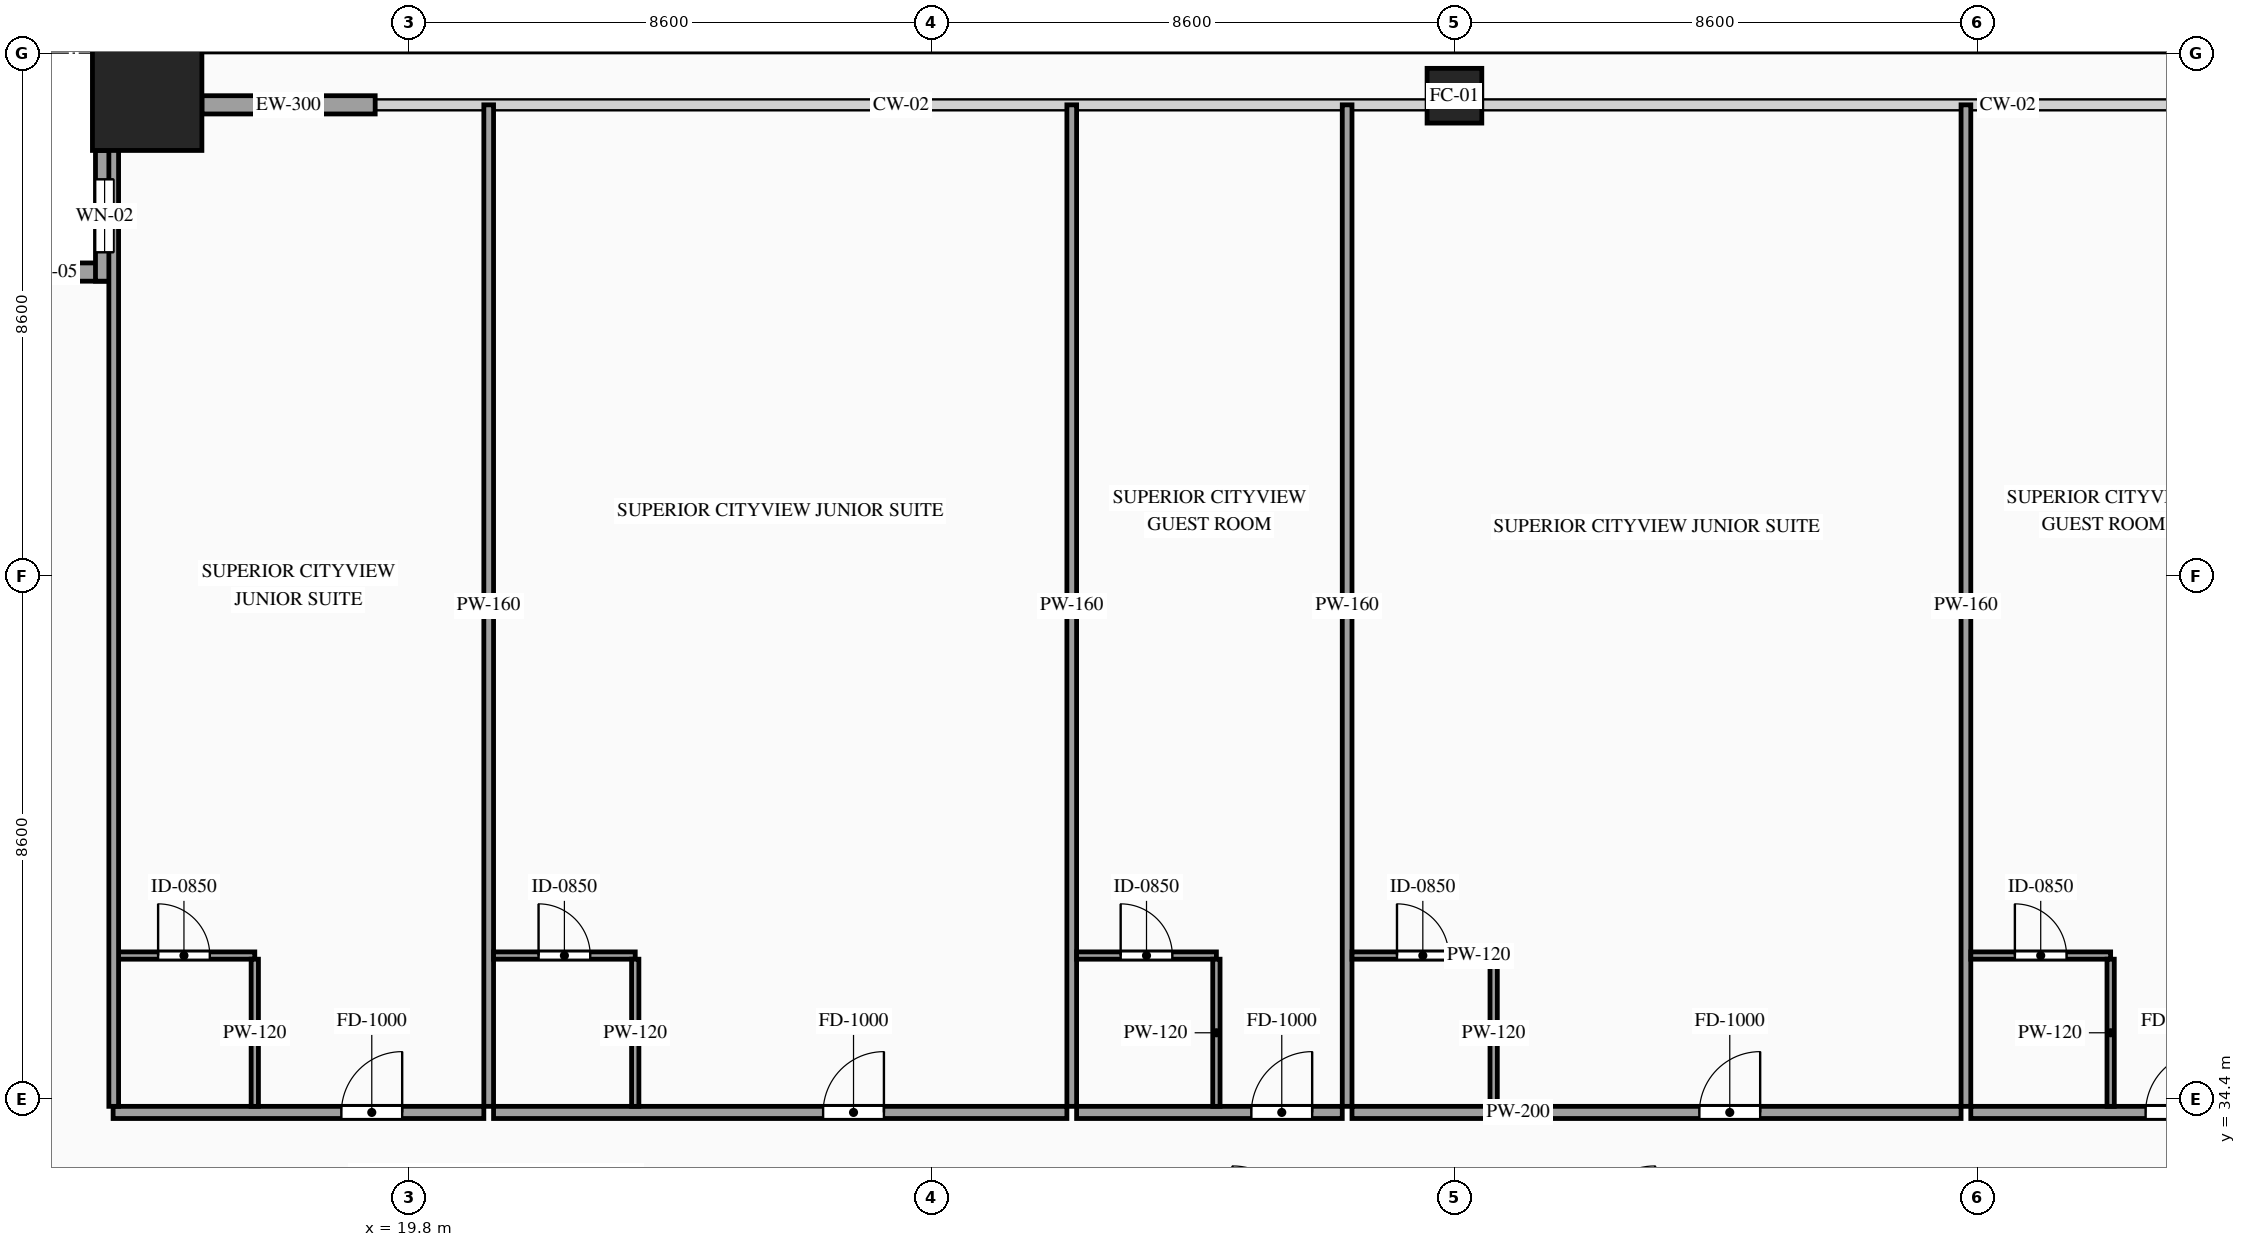
"""IFC4 building model, lengths in metres.
Left out: names, types, materials, properties, quantities, classifications, styles, units other than length and angle.
Written with IfcOpenShell. Run it as: python <this file> out.ifc"""

import sys

from ifc_helpers import new_model, si_unit, direction, frame, frame_2d, origin, origin_2d, place, context, subcontext, project, spatial, rectangle, hollow_rectangle, extrude, source, transform, mapped, element, fill, save


model = new_model("IFC4")
c1 = context("Model", 3, precision=1e-05, world=origin(), true_north=direction((0.0, 1.0)))
c2 = subcontext(c1, "Body", "Model", "MODEL_VIEW")
j1 = project(units=[si_unit("LENGTHUNIT", "METRE"), si_unit("PLANEANGLEUNIT", "RADIAN")], contexts=[c1])
p1 = place(None, origin())
s1 = spatial("IfcSite", under=j1, at=p1, CompositionType="ELEMENT")
p2 = place(p1, origin())
s2 = spatial("IfcBuilding", under=s1, at=p2, CompositionType="ELEMENT")
p3 = place(p2, frame((0.0, 0.0, 71.2)))
s3 = spatial("IfcBuildingStorey", under=s2, at=p3, CompositionType="ELEMENT", Elevation=71.2)
m1 = source(origin(), c2, "Body", "SweptSolid", [
    extrude(hollow_rectangle(XDim=1.8, YDim=1.8, WallThickness=0.08, at=origin_2d()), origin(), (0.0, 0.0, 1.0), 3.6),
])
p4 = place(p3, frame((15.5, 50.9, 0.0), z_axis=(0.0, 0.0, 1.0), x_axis=(1.0, 0.0, 0.0)))
e1 = element("IfcColumn", 1, at=p4, inside=s3, PredefinedType="COLUMN", context=c2, shape_type="MappedRepresentation", body=[
    mapped(m1, transform((0.0, 0.0, 0.0), scale=1.0)),
])
m2 = source(origin(), c2, "Body", "SweptSolid", [
    extrude(hollow_rectangle(XDim=0.9, YDim=0.9, WallThickness=0.042, at=origin_2d()), origin(), (0.0, 0.0, 1.0), 3.6),
])
p5 = place(p3, frame((37.0, 50.9, 0.0), z_axis=(0.0, 0.0, 1.0), x_axis=(1.0, 0.0, 0.0)))
e2 = element("IfcColumn", 2, at=p5, inside=s3, PredefinedType="COLUMN", context=c2, shape_type="MappedRepresentation", body=[
    mapped(m2, transform((0.0, 0.0, 0.0), scale=1.0)),
])
p6 = place(p3, frame((14.95, 48.0, 0.0), z_axis=(0.0, 0.0, 1.0), x_axis=(-1.0, 0.0, 0.0)))
e3 = element("IfcWall", 3, at=p6, inside=s3, PredefinedType="SOLIDWALL", context=c2, shape_type="SweptSolid", body=[
    extrude(rectangle(XDim=2.15, YDim=0.3, at=frame_2d((1.075, 0.0))), origin(), (0.0, 0.0, 1.0), 3.38),
])
p7 = place(p6, frame((0.625, 0.0, 0.85)))
e4 = element("IfcOpeningElement", 4, at=p7, cuts=e3, PredefinedType="OPENING", context=c2, shape_type="SweptSolid", body=[
    extrude(rectangle(XDim=0.9, YDim=1.5, at=frame_2d((0.45, 0.75))), frame((0.0, 0.165, 0.0), z_axis=(0.0, -1.0, 0.0), x_axis=(1.0, 0.0, 0.0)), (0.0, 0.0, 1.0), 0.33),
])
p8 = place(p3, frame((14.8, 50.0, 0.0), z_axis=(0.0, 0.0, 1.0), x_axis=(0.0, -1.0, 0.0)))
e5 = element("IfcWall", 5, at=p8, inside=s3, PredefinedType="SOLIDWALL", context=c2, shape_type="SweptSolid", body=[
    extrude(rectangle(XDim=2.15, YDim=0.3, at=frame_2d((1.075, 0.0))), origin(), (0.0, 0.0, 1.0), 3.38),
])
p9 = place(p8, frame((0.475, 0.0, 0.85)))
e6 = element("IfcOpeningElement", 6, at=p9, cuts=e5, PredefinedType="OPENING", context=c2, shape_type="SweptSolid", body=[
    extrude(rectangle(XDim=1.2, YDim=2.1, at=frame_2d((0.6, 1.05))), frame((0.0, 0.165, 0.0), z_axis=(0.0, -1.0, 0.0), x_axis=(1.0, 0.0, 0.0)), (0.0, 0.0, 1.0), 0.33),
])
m3 = source(origin(), c2, "Body", "SweptSolid", [
    extrude(rectangle(XDim=2.85, YDim=0.3, at=frame_2d((1.425, 0.0))), origin(), (0.0, 0.0, 1.0), 2.775),
])
p10 = place(p3, frame((16.4, 50.75, 0.0), z_axis=(0.0, 0.0, 1.0), x_axis=(1.0, 0.0, 0.0)))
e7 = element("IfcWall", 7, at=p10, inside=s3, PredefinedType="SOLIDWALL", context=c2, shape_type="MappedRepresentation", body=[
    mapped(m3, transform((0.0, 0.0, 0.0), scale=1.0)),
])
p11 = place(p3, frame((14.94, 34.18, 0.0), z_axis=(0.0, 0.0, 1.0), x_axis=(1.0, 0.0, 0.0)))
e8 = element("IfcWall", 8, at=p11, inside=s3, PredefinedType="PARTITIONING", context=c2, shape_type="SweptSolid", body=[
    extrude(rectangle(XDim=6.097, YDim=0.2, at=frame_2d((3.049, 0.0))), origin(), (0.0, 0.0, 1.0), 3.38),
])
p12 = place(p11, frame((3.754, 0.0, 0.0)))
e9 = element("IfcOpeningElement", 9, at=p12, cuts=e8, PredefinedType="OPENING", context=c2, shape_type="SweptSolid", body=[
    extrude(rectangle(XDim=1.0, YDim=2.2, at=frame_2d((0.5, 1.1))), frame((0.0, 0.115, 0.0), z_axis=(0.0, -1.0, 0.0), x_axis=(1.0, 0.0, 0.0)), (0.0, 0.0, 1.0), 0.23),
])
m4 = source(origin(), c2, "Body", "SweptSolid", [
    extrude(rectangle(XDim=16.47, YDim=0.16, at=frame_2d((8.235, 0.0))), origin(), (0.0, 0.0, 1.0), 3.38),
])
p13 = place(p3, frame((21.117, 34.28, 0.0), z_axis=(0.0, 0.0, 1.0), x_axis=(0.0, 1.0, 0.0)))
e10 = element("IfcWall", 10, at=p13, inside=s3, PredefinedType="PARTITIONING", context=c2, shape_type="MappedRepresentation", body=[
    mapped(m4, transform((0.0, 0.0, 0.0), scale=1.0)),
])
p14 = place(p3, frame((14.94, 36.76, 0.0), z_axis=(0.0, 0.0, 1.0), x_axis=(1.0, 0.0, 0.0)))
e11 = element("IfcWall", 11, at=p14, inside=s3, PredefinedType="PARTITIONING", context=c2, shape_type="SweptSolid", body=[
    extrude(rectangle(XDim=2.33, YDim=0.12, at=frame_2d((1.165, 0.0))), origin(), (0.0, 0.0, 1.0), 3.38),
])
p15 = place(p14, frame((0.74, 0.0, 0.0)))
e12 = element("IfcOpeningElement", 12, at=p15, cuts=e11, PredefinedType="OPENING", context=c2, shape_type="SweptSolid", body=[
    extrude(rectangle(XDim=0.85, YDim=2.1, at=frame_2d((0.425, 1.05))), frame((0.0, 0.075, 0.0), z_axis=(0.0, -1.0, 0.0), x_axis=(1.0, 0.0, 0.0)), (0.0, 0.0, 1.0), 0.15),
])
m5 = source(origin(), c2, "Body", "SweptSolid", [
    extrude(rectangle(XDim=2.42, YDim=0.12, at=frame_2d((1.21, 0.0))), origin(), (0.0, 0.0, 1.0), 3.38),
])
p16 = place(p3, frame((17.27, 34.28, 0.0), z_axis=(0.0, 0.0, 1.0), x_axis=(0.0, 1.0, 0.0)))
e13 = element("IfcWall", 13, at=p16, inside=s3, PredefinedType="PARTITIONING", context=c2, shape_type="MappedRepresentation", body=[
    mapped(m5, transform((0.0, 0.0, 0.0), scale=1.0)),
])
p17 = place(p3, frame((21.197, 34.18, 0.0), z_axis=(0.0, 0.0, 1.0), x_axis=(1.0, 0.0, 0.0)))
e14 = element("IfcWall", 14, at=p17, inside=s3, PredefinedType="PARTITIONING", context=c2, shape_type="SweptSolid", body=[
    extrude(rectangle(XDim=9.429, YDim=0.2, at=frame_2d((4.714, 0.0))), origin(), (0.0, 0.0, 1.0), 3.38),
])
p18 = place(p17, frame((5.42, 0.0, 0.0)))
e15 = element("IfcOpeningElement", 15, at=p18, cuts=e14, PredefinedType="OPENING", context=c2, shape_type="SweptSolid", body=[
    extrude(rectangle(XDim=1.0, YDim=2.2, at=frame_2d((0.5, 1.1))), frame((0.0, 0.115, 0.0), z_axis=(0.0, -1.0, 0.0), x_axis=(1.0, 0.0, 0.0)), (0.0, 0.0, 1.0), 0.23),
])
p19 = place(p3, frame((30.706, 34.28, 0.0), z_axis=(0.0, 0.0, 1.0), x_axis=(0.0, 1.0, 0.0)))
e16 = element("IfcWall", 16, at=p19, inside=s3, PredefinedType="PARTITIONING", context=c2, shape_type="MappedRepresentation", body=[
    mapped(m4, transform((0.0, 0.0, 0.0), scale=1.0)),
])
p20 = place(p3, frame((21.197, 36.76, 0.0), z_axis=(0.0, 0.0, 1.0), x_axis=(1.0, 0.0, 0.0)))
e17 = element("IfcWall", 17, at=p20, inside=s3, PredefinedType="PARTITIONING", context=c2, shape_type="SweptSolid", body=[
    extrude(rectangle(XDim=2.33, YDim=0.12, at=frame_2d((1.165, 0.0))), origin(), (0.0, 0.0, 1.0), 3.38),
])
p21 = place(p20, frame((0.74, 0.0, 0.0)))
e18 = element("IfcOpeningElement", 18, at=p21, cuts=e17, PredefinedType="OPENING", context=c2, shape_type="SweptSolid", body=[
    extrude(rectangle(XDim=0.85, YDim=2.1, at=frame_2d((0.425, 1.05))), frame((0.0, 0.075, 0.0), z_axis=(0.0, -1.0, 0.0), x_axis=(1.0, 0.0, 0.0)), (0.0, 0.0, 1.0), 0.15),
])
p22 = place(p3, frame((23.527, 34.28, 0.0), z_axis=(0.0, 0.0, 1.0), x_axis=(0.0, 1.0, 0.0)))
e19 = element("IfcWall", 19, at=p22, inside=s3, PredefinedType="PARTITIONING", context=c2, shape_type="MappedRepresentation", body=[
    mapped(m5, transform((0.0, 0.0, 0.0), scale=1.0)),
])
p23 = place(p3, frame((30.786, 34.18, 0.0), z_axis=(0.0, 0.0, 1.0), x_axis=(1.0, 0.0, 0.0)))
e20 = element("IfcWall", 20, at=p23, inside=s3, PredefinedType="PARTITIONING", context=c2, shape_type="SweptSolid", body=[
    extrude(rectangle(XDim=4.369, YDim=0.2, at=frame_2d((2.185, 0.0))), origin(), (0.0, 0.0, 1.0), 3.38),
])
p24 = place(p23, frame((2.874, 0.0, 0.0)))
e21 = element("IfcOpeningElement", 21, at=p24, cuts=e20, PredefinedType="OPENING", context=c2, shape_type="SweptSolid", body=[
    extrude(rectangle(XDim=1.0, YDim=2.2, at=frame_2d((0.5, 1.1))), frame((0.0, 0.115, 0.0), z_axis=(0.0, -1.0, 0.0), x_axis=(1.0, 0.0, 0.0)), (0.0, 0.0, 1.0), 0.23),
])
p25 = place(p3, frame((35.235, 34.28, 0.0), z_axis=(0.0, 0.0, 1.0), x_axis=(0.0, 1.0, 0.0)))
e22 = element("IfcWall", 22, at=p25, inside=s3, PredefinedType="PARTITIONING", context=c2, shape_type="MappedRepresentation", body=[
    mapped(m4, transform((0.0, 0.0, 0.0), scale=1.0)),
])
p26 = place(p3, frame((30.786, 36.76, 0.0), z_axis=(0.0, 0.0, 1.0), x_axis=(1.0, 0.0, 0.0)))
e23 = element("IfcWall", 23, at=p26, inside=s3, PredefinedType="PARTITIONING", context=c2, shape_type="SweptSolid", body=[
    extrude(rectangle(XDim=2.299, YDim=0.12, at=frame_2d((1.149, 0.0))), origin(), (0.0, 0.0, 1.0), 3.38),
])
p27 = place(p26, frame((0.725, 0.0, 0.0)))
e24 = element("IfcOpeningElement", 24, at=p27, cuts=e23, PredefinedType="OPENING", context=c2, shape_type="SweptSolid", body=[
    extrude(rectangle(XDim=0.85, YDim=2.1, at=frame_2d((0.425, 1.05))), frame((0.0, 0.075, 0.0), z_axis=(0.0, -1.0, 0.0), x_axis=(1.0, 0.0, 0.0)), (0.0, 0.0, 1.0), 0.15),
])
p28 = place(p3, frame((33.085, 34.28, 0.0), z_axis=(0.0, 0.0, 1.0), x_axis=(0.0, 1.0, 0.0)))
e25 = element("IfcWall", 25, at=p28, inside=s3, PredefinedType="PARTITIONING", context=c2, shape_type="MappedRepresentation", body=[
    mapped(m5, transform((0.0, 0.0, 0.0), scale=1.0)),
])
p29 = place(p3, frame((35.315, 34.18, 0.0), z_axis=(0.0, 0.0, 1.0), x_axis=(1.0, 0.0, 0.0)))
e26 = element("IfcWall", 26, at=p29, inside=s3, PredefinedType="PARTITIONING", context=c2, shape_type="SweptSolid", body=[
    extrude(rectangle(XDim=10.017, YDim=0.2, at=frame_2d((5.009, 0.0))), origin(), (0.0, 0.0, 1.0), 3.38),
])
p30 = place(p29, frame((5.713, 0.0, 0.0)))
e27 = element("IfcOpeningElement", 27, at=p30, cuts=e26, PredefinedType="OPENING", context=c2, shape_type="SweptSolid", body=[
    extrude(rectangle(XDim=1.0, YDim=2.2, at=frame_2d((0.5, 1.1))), frame((0.0, 0.115, 0.0), z_axis=(0.0, -1.0, 0.0), x_axis=(1.0, 0.0, 0.0)), (0.0, 0.0, 1.0), 0.23),
])
p31 = place(p3, frame((45.412, 34.28, 0.0), z_axis=(0.0, 0.0, 1.0), x_axis=(0.0, 1.0, 0.0)))
e28 = element("IfcWall", 28, at=p31, inside=s3, PredefinedType="PARTITIONING", context=c2, shape_type="MappedRepresentation", body=[
    mapped(m4, transform((0.0, 0.0, 0.0), scale=1.0)),
])
p32 = place(p3, frame((35.315, 36.76, 0.0), z_axis=(0.0, 0.0, 1.0), x_axis=(1.0, 0.0, 0.0)))
e29 = element("IfcWall", 29, at=p32, inside=s3, PredefinedType="PARTITIONING", context=c2, shape_type="SweptSolid", body=[
    extrude(rectangle(XDim=2.33, YDim=0.12, at=frame_2d((1.165, 0.0))), origin(), (0.0, 0.0, 1.0), 3.38),
])
p33 = place(p32, frame((0.74, 0.0, 0.0)))
e30 = element("IfcOpeningElement", 30, at=p33, cuts=e29, PredefinedType="OPENING", context=c2, shape_type="SweptSolid", body=[
    extrude(rectangle(XDim=0.85, YDim=2.1, at=frame_2d((0.425, 1.05))), frame((0.0, 0.075, 0.0), z_axis=(0.0, -1.0, 0.0), x_axis=(1.0, 0.0, 0.0)), (0.0, 0.0, 1.0), 0.15),
])
p34 = place(p3, frame((37.645, 34.28, 0.0), z_axis=(0.0, 0.0, 1.0), x_axis=(0.0, 1.0, 0.0)))
e31 = element("IfcWall", 31, at=p34, inside=s3, PredefinedType="PARTITIONING", context=c2, shape_type="MappedRepresentation", body=[
    mapped(m5, transform((0.0, 0.0, 0.0), scale=1.0)),
])
p35 = place(p3, frame((45.492, 34.18, 0.0), z_axis=(0.0, 0.0, 1.0), x_axis=(1.0, 0.0, 0.0)))
e32 = element("IfcWall", 32, at=p35, inside=s3, PredefinedType="PARTITIONING", context=c2, shape_type="SweptSolid", body=[
    extrude(rectangle(XDim=4.37, YDim=0.2, at=frame_2d((2.185, 0.0))), origin(), (0.0, 0.0, 1.0), 3.38),
])
p36 = place(p35, frame((2.875, 0.0, 0.0)))
e33 = element("IfcOpeningElement", 33, at=p36, cuts=e32, PredefinedType="OPENING", context=c2, shape_type="SweptSolid", body=[
    extrude(rectangle(XDim=1.0, YDim=2.2, at=frame_2d((0.5, 1.1))), frame((0.0, 0.115, 0.0), z_axis=(0.0, -1.0, 0.0), x_axis=(1.0, 0.0, 0.0)), (0.0, 0.0, 1.0), 0.23),
])
p37 = place(p3, frame((45.492, 36.76, 0.0), z_axis=(0.0, 0.0, 1.0), x_axis=(1.0, 0.0, 0.0)))
e34 = element("IfcWall", 34, at=p37, inside=s3, PredefinedType="PARTITIONING", context=c2, shape_type="SweptSolid", body=[
    extrude(rectangle(XDim=2.3, YDim=0.12, at=frame_2d((1.15, 0.0))), origin(), (0.0, 0.0, 1.0), 3.38),
])
p38 = place(p37, frame((0.725, 0.0, 0.0)))
e35 = element("IfcOpeningElement", 35, at=p38, cuts=e34, PredefinedType="OPENING", context=c2, shape_type="SweptSolid", body=[
    extrude(rectangle(XDim=0.85, YDim=2.1, at=frame_2d((0.425, 1.05))), frame((0.0, 0.075, 0.0), z_axis=(0.0, -1.0, 0.0), x_axis=(1.0, 0.0, 0.0)), (0.0, 0.0, 1.0), 0.15),
])
p39 = place(p3, frame((47.792, 34.28, 0.0), z_axis=(0.0, 0.0, 1.0), x_axis=(0.0, 1.0, 0.0)))
e36 = element("IfcWall", 36, at=p39, inside=s3, PredefinedType="PARTITIONING", context=c2, shape_type="MappedRepresentation", body=[
    mapped(m5, transform((0.0, 0.0, 0.0), scale=1.0)),
])
m6 = source(origin(), c2, "Body", "SweptSolid", [
    extrude(rectangle(XDim=16.32, YDim=0.16, at=frame_2d((8.16, 0.0))), origin(), (0.0, 0.0, 1.0), 3.38),
])
p40 = place(p3, frame((14.95, 34.28, 0.0), z_axis=(0.0, 0.0, 1.0), x_axis=(0.0, 1.0, 0.0)))
e37 = element("IfcWall", 37, at=p40, inside=s3, PredefinedType="PARTITIONING", context=c2, shape_type="MappedRepresentation", body=[
    mapped(m6, transform((0.0, 0.0, 0.0), scale=1.0)),
])
m7 = source(origin(), c2, "Body", "SweptSolid", [
    extrude(rectangle(XDim=0.9, YDim=1.5, at=frame_2d((0.45, 0.75))), frame((0.0, 0.03, 0.0), z_axis=(0.0, -1.0, 0.0), x_axis=(1.0, 0.0, 0.0)), (0.0, 0.0, 1.0), 0.06),
])
p41 = place(p7, origin())
e38 = element("IfcWindow", 38, at=p41, inside=s3, PartitioningType="SINGLE_PANEL", PredefinedType="WINDOW", context=c2, shape_type="MappedRepresentation", body=[
    mapped(m7, transform((0.0, 0.0, 0.0), scale=1.0)),
])
fill(e4, e38)
m8 = source(origin(), c2, "Body", "SweptSolid", [
    extrude(rectangle(XDim=1.2, YDim=2.1, at=frame_2d((0.6, 1.05))), frame((0.0, 0.03, 0.0), z_axis=(0.0, -1.0, 0.0), x_axis=(1.0, 0.0, 0.0)), (0.0, 0.0, 1.0), 0.06),
])
p42 = place(p9, origin())
e39 = element("IfcWindow", 39, at=p42, inside=s3, PartitioningType="SINGLE_PANEL", PredefinedType="WINDOW", context=c2, shape_type="MappedRepresentation", body=[
    mapped(m8, transform((0.0, 0.0, 0.0), scale=1.0)),
])
fill(e6, e39)
m9 = source(origin(), c2, "Body", "SweptSolid", [
    extrude(rectangle(XDim=1.0, YDim=2.2, at=frame_2d((0.5, 1.1))), frame((0.0, 0.025, 0.0), z_axis=(0.0, -1.0, 0.0), x_axis=(1.0, 0.0, 0.0)), (0.0, 0.0, 1.0), 0.05),
])
p43 = place(p12, origin())
e40 = element("IfcDoor", 40, at=p43, inside=s3, OperationType="SINGLE_SWING_RIGHT", PredefinedType="DOOR", context=c2, shape_type="MappedRepresentation", body=[
    mapped(m9, transform((0.0, 0.0, 0.0), scale=1.0)),
])
fill(e9, e40)
m10 = source(origin(), c2, "Body", "SweptSolid", [
    extrude(rectangle(XDim=0.85, YDim=2.1, at=frame_2d((0.425, 1.05))), frame((0.0, 0.025, 0.0), z_axis=(0.0, -1.0, 0.0), x_axis=(1.0, 0.0, 0.0)), (0.0, 0.0, 1.0), 0.05),
])
p44 = place(p15, origin())
e41 = element("IfcDoor", 41, at=p44, inside=s3, OperationType="SINGLE_SWING_LEFT", PredefinedType="DOOR", context=c2, shape_type="MappedRepresentation", body=[
    mapped(m10, transform((0.0, 0.0, 0.0), scale=1.0)),
])
fill(e12, e41)
p45 = place(p18, origin())
e42 = element("IfcDoor", 42, at=p45, inside=s3, OperationType="SINGLE_SWING_RIGHT", PredefinedType="DOOR", context=c2, shape_type="MappedRepresentation", body=[
    mapped(m9, transform((0.0, 0.0, 0.0), scale=1.0)),
])
fill(e15, e42)
p46 = place(p21, origin())
e43 = element("IfcDoor", 43, at=p46, inside=s3, OperationType="SINGLE_SWING_LEFT", PredefinedType="DOOR", context=c2, shape_type="MappedRepresentation", body=[
    mapped(m10, transform((0.0, 0.0, 0.0), scale=1.0)),
])
fill(e18, e43)
p47 = place(p24, origin())
e44 = element("IfcDoor", 44, at=p47, inside=s3, OperationType="SINGLE_SWING_RIGHT", PredefinedType="DOOR", context=c2, shape_type="MappedRepresentation", body=[
    mapped(m9, transform((0.0, 0.0, 0.0), scale=1.0)),
])
fill(e21, e44)
p48 = place(p27, origin())
e45 = element("IfcDoor", 45, at=p48, inside=s3, OperationType="SINGLE_SWING_LEFT", PredefinedType="DOOR", context=c2, shape_type="MappedRepresentation", body=[
    mapped(m10, transform((0.0, 0.0, 0.0), scale=1.0)),
])
fill(e24, e45)
p49 = place(p30, origin())
e46 = element("IfcDoor", 46, at=p49, inside=s3, OperationType="SINGLE_SWING_RIGHT", PredefinedType="DOOR", context=c2, shape_type="MappedRepresentation", body=[
    mapped(m9, transform((0.0, 0.0, 0.0), scale=1.0)),
])
fill(e27, e46)
p50 = place(p33, origin())
e47 = element("IfcDoor", 47, at=p50, inside=s3, OperationType="SINGLE_SWING_LEFT", PredefinedType="DOOR", context=c2, shape_type="MappedRepresentation", body=[
    mapped(m10, transform((0.0, 0.0, 0.0), scale=1.0)),
])
fill(e30, e47)
p51 = place(p36, origin())
e48 = element("IfcDoor", 48, at=p51, inside=s3, OperationType="SINGLE_SWING_RIGHT", PredefinedType="DOOR", context=c2, shape_type="MappedRepresentation", body=[
    mapped(m9, transform((0.0, 0.0, 0.0), scale=1.0)),
])
fill(e33, e48)
p52 = place(p38, origin())
e49 = element("IfcDoor", 49, at=p52, inside=s3, OperationType="SINGLE_SWING_LEFT", PredefinedType="DOOR", context=c2, shape_type="MappedRepresentation", body=[
    mapped(m10, transform((0.0, 0.0, 0.0), scale=1.0)),
])
fill(e35, e49)
save(model, sys.argv[1])
